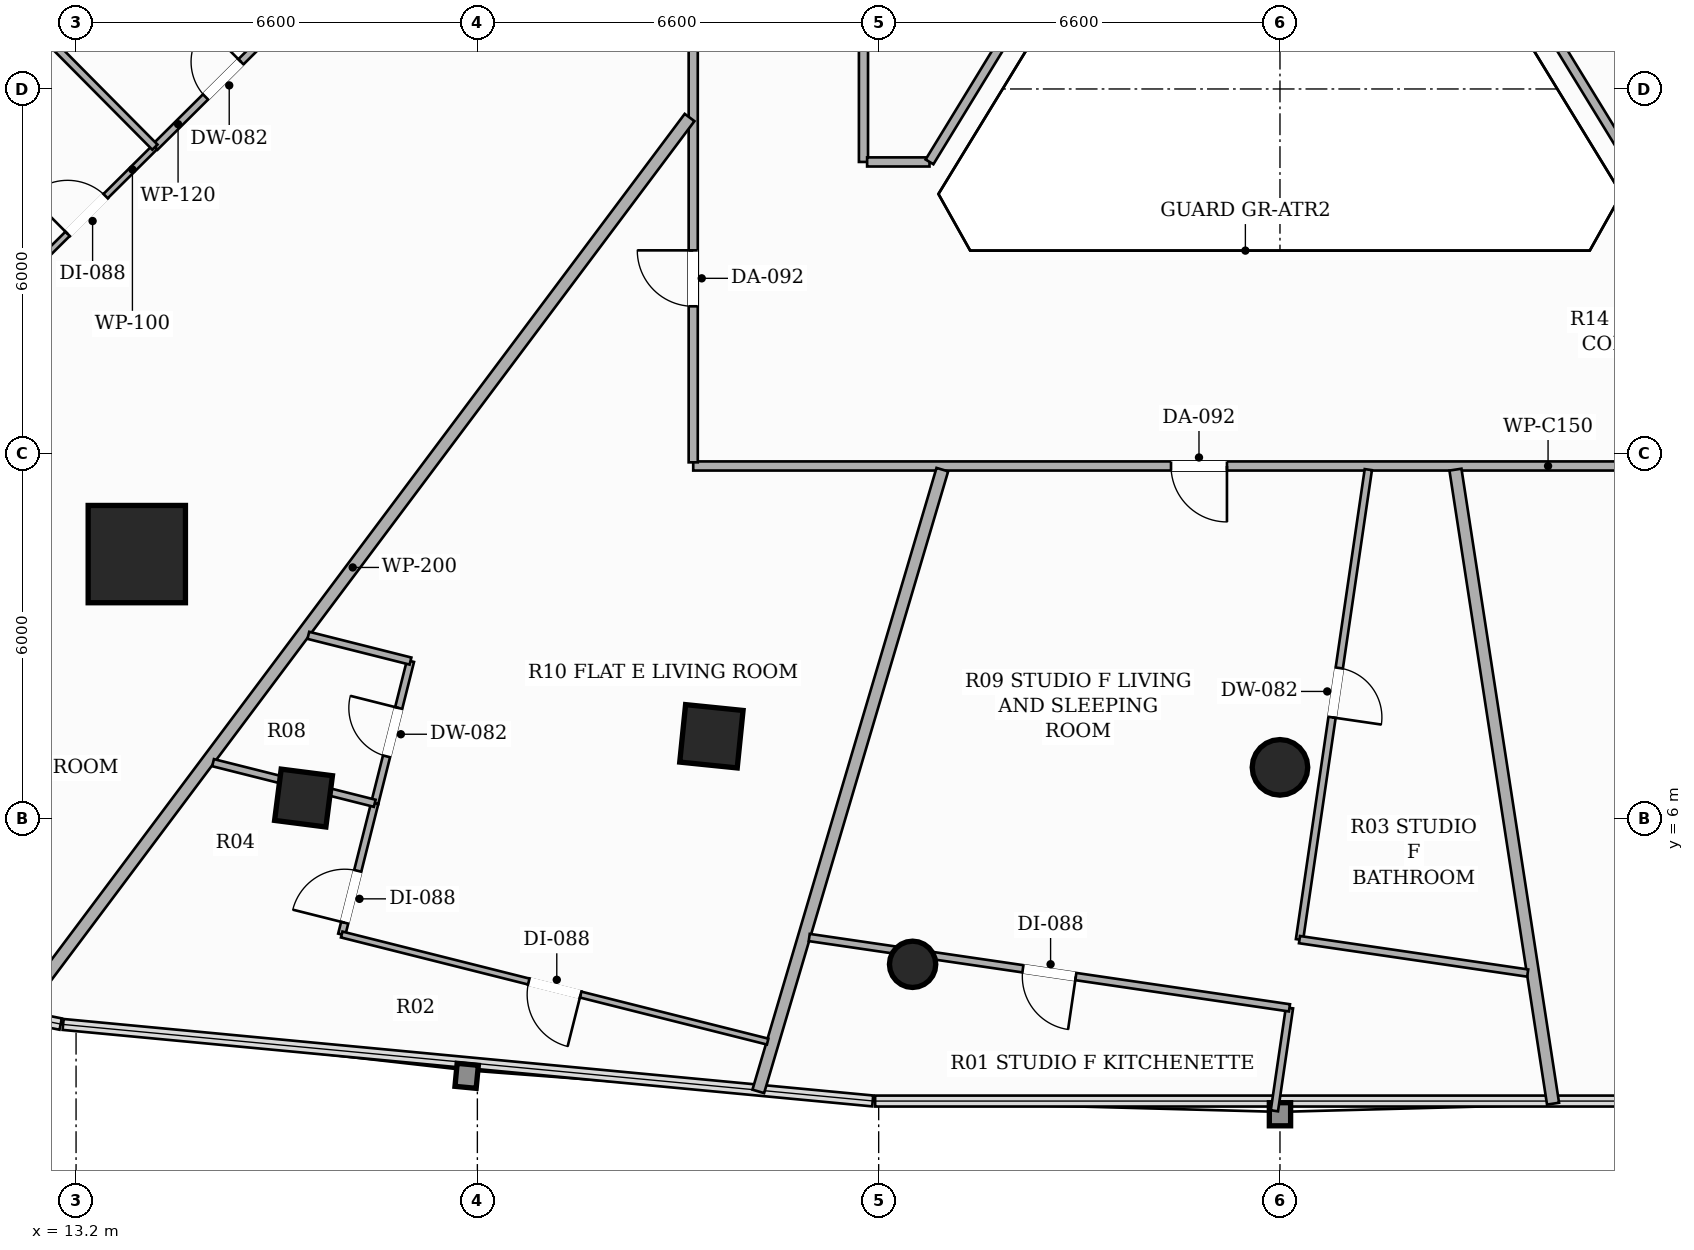
"""IFC4 building model, lengths in metres.
Left out: names, types, materials, properties, quantities, classifications, styles, units other than length and angle.
Written with IfcOpenShell. Run it as: python <this file> out.ifc"""

import sys

from ifc_helpers import new_model, si_unit, direction, frame, frame_2d, origin, origin_2d, place, context, subcontext, project, spatial, rectangle, hollow_rectangle, hollow_circle, extrude, element, fill, save


model = new_model("IFC4")
c1 = context("Model", 3, precision=1e-05, world=origin(), true_north=direction((0.0, 1.0)))
c2 = subcontext(c1, "Body", "Model", "MODEL_VIEW")
j1 = project(units=[si_unit("LENGTHUNIT", "METRE"), si_unit("PLANEANGLEUNIT", "RADIAN")], contexts=[c1])
p1 = place(None, origin())
s1 = spatial("IfcSite", under=j1, at=p1, CompositionType="ELEMENT")
p2 = place(p1, origin())
s2 = spatial("IfcBuilding", under=s1, at=p2, CompositionType="ELEMENT")
p3 = place(p2, frame((0.0, 0.0, 40.1)))
s3 = spatial("IfcBuildingStorey", under=s2, at=p3, CompositionType="ELEMENT", Elevation=40.1)
p4 = place(p3, frame((14.199, 10.351, 0.0), z_axis=(0.0, 0.0, 1.0), x_axis=(1.0, 0.0, 0.0)))
e1 = element("IfcColumn", 1, at=p4, inside=s3, PredefinedType="COLUMN", context=c2, shape_type="SweptSolid", body=[
    extrude(hollow_rectangle(XDim=1.6, YDim=1.6, WallThickness=0.05, at=origin_2d()), origin(), (0.0, 0.0, 1.0), 3.3),
])
p5 = place(p3, frame((23.649, 7.355, 0.0), z_axis=(0.0, 0.0, 1.0), x_axis=(-0.994880708829, 0.101056297183, 0.0)))
e2 = element("IfcColumn", 2, at=p5, inside=s3, PredefinedType="COLUMN", context=c2, shape_type="SweptSolid", body=[
    extrude(hollow_rectangle(XDim=0.95, YDim=0.95, WallThickness=0.032, at=origin_2d()), origin(), (0.0, 0.0, 1.0), 3.3),
])
p6 = place(p3, frame((33.0, 6.844, 0.0), z_axis=(0.0, 0.0, 1.0), x_axis=(1.0, 0.0, 0.0)))
e3 = element("IfcColumn", 3, at=p6, inside=s3, PredefinedType="COLUMN", context=c2, shape_type="SweptSolid", body=[
    extrude(hollow_circle(Radius=0.457, WallThickness=0.025, at=origin_2d()), origin(), (0.0, 0.0, 1.0), 3.3),
])
p7 = place(p3, frame((16.941, 6.339, 0.0), z_axis=(0.0, 0.0, 1.0), x_axis=(-0.99189444259, 0.127064608601, 0.0)))
e4 = element("IfcColumn", 4, at=p7, inside=s3, PredefinedType="COLUMN", context=c2, shape_type="SweptSolid", body=[
    extrude(hollow_rectangle(XDim=0.85, YDim=0.85, WallThickness=0.028, at=origin_2d()), origin(), (0.0, 0.0, 1.0), 3.3),
])
p8 = place(p3, frame((26.958, 3.605, 0.0), z_axis=(0.0, 0.0, 1.0), x_axis=(1.0, 0.0, 0.0)))
e5 = element("IfcColumn", 5, at=p8, inside=s3, PredefinedType="COLUMN", context=c2, shape_type="SweptSolid", body=[
    extrude(hollow_circle(Radius=0.381, WallThickness=0.022, at=origin_2d()), origin(), (0.0, 0.0, 1.0), 3.3),
])
p9 = place(p3, frame((42.59, 11.8, 0.0), z_axis=(0.0, 0.0, 1.0), x_axis=(-1.0, 0.0, 0.0)))
e6 = element("IfcWall", 6, at=p9, inside=s3, PredefinedType="PARTITIONING", context=c2, shape_type="SweptSolid", body=[
    extrude(rectangle(XDim=19.24, YDim=0.15, at=frame_2d((9.62, 0.0))), origin(), (0.0, 0.0, 1.0), 2.669),
])
p10 = place(p9, frame((10.462, 0.0, 0.0)))
e7 = element("IfcOpeningElement", 7, at=p10, cuts=e6, PredefinedType="OPENING", context=c2, shape_type="SweptSolid", body=[
    extrude(rectangle(XDim=0.92, YDim=2.15, at=frame_2d((0.46, 1.075))), frame((0.0, 0.085, 0.0), z_axis=(0.0, -1.0, 0.0), x_axis=(1.0, 0.0, 0.0)), (0.0, 0.0, 1.0), 0.17),
])
p11 = place(p3, frame((23.35, 11.86, 0.0), z_axis=(0.0, 0.0, 1.0), x_axis=(0.0, 1.0, 0.0)))
e8 = element("IfcWall", 8, at=p11, inside=s3, PredefinedType="PARTITIONING", context=c2, shape_type="SweptSolid", body=[
    extrude(rectangle(XDim=25.04, YDim=0.15, at=frame_2d((12.52, 0.0))), origin(), (0.0, 0.0, 1.0), 2.413),
])
p12 = place(p11, frame((9.29, 0.0, 0.0)))
e9 = element("IfcOpeningElement", 9, at=p12, cuts=e8, PredefinedType="OPENING", context=c2, shape_type="SweptSolid", body=[
    extrude(rectangle(XDim=0.92, YDim=2.15, at=frame_2d((0.46, 1.075))), frame((0.0, 0.085, 0.0), z_axis=(0.0, -1.0, 0.0), x_axis=(1.0, 0.0, 0.0)), (0.0, 0.0, 1.0), 0.17),
])
p13 = place(p11, frame((18.865, 0.0, 0.0)))
e10 = element("IfcOpeningElement", 10, at=p13, cuts=e8, PredefinedType="OPENING", context=c2, shape_type="SweptSolid", body=[
    extrude(rectangle(XDim=0.88, YDim=2.1, at=frame_2d((0.44, 1.05))), frame((0.0, 0.085, 0.0), z_axis=(0.0, -1.0, 0.0), x_axis=(1.0, 0.0, 0.0)), (0.0, 0.0, 1.0), 0.17),
])
p14 = place(p11, frame((2.566, 0.0, 0.0)))
e11 = element("IfcOpeningElement", 11, at=p14, cuts=e8, PredefinedType="OPENING", context=c2, shape_type="SweptSolid", body=[
    extrude(rectangle(XDim=0.92, YDim=2.15, at=frame_2d((0.46, 1.075))), frame((0.0, 0.085, 0.0), z_axis=(0.0, -1.0, 0.0), x_axis=(1.0, 0.0, 0.0)), (0.0, 0.0, 1.0), 0.17),
])
p15 = place(p3, frame((26.15, 23.79, 0.0), z_axis=(0.0, 0.0, 1.0), x_axis=(0.0, -1.0, 0.0)))
e12 = element("IfcWall", 12, at=p15, inside=s3, PredefinedType="PARTITIONING", context=c2, shape_type="SweptSolid", body=[
    extrude(rectangle(XDim=6.99, YDim=0.15, at=frame_2d((3.495, 0.0))), origin(), (0.0, 0.0, 1.0), 2.669),
])
p16 = place(p15, frame((3.055, 0.0, 0.0)))
e13 = element("IfcOpeningElement", 13, at=p16, cuts=e12, PredefinedType="OPENING", context=c2, shape_type="SweptSolid", body=[
    extrude(rectangle(XDim=0.88, YDim=2.1, at=frame_2d((0.44, 1.05))), frame((0.0, 0.085, 0.0), z_axis=(0.0, -1.0, 0.0), x_axis=(1.0, 0.0, 0.0)), (0.0, 0.0, 1.0), 0.17),
])
p17 = place(p3, frame((26.21, 16.8, 0.0), z_axis=(0.0, 0.0, 1.0), x_axis=(1.0, 0.0, 0.0)))
e14 = element("IfcWall", 14, at=p17, inside=s3, PredefinedType="PARTITIONING", context=c2, shape_type="SweptSolid", body=[
    extrude(rectangle(XDim=1.026, YDim=0.15, at=frame_2d((0.513, 0.0))), origin(), (0.0, 0.0, 1.0), 3.06),
])
p18 = place(p3, frame((27.236, 16.801, 0.0), z_axis=(0.0, 0.0, 1.0), x_axis=(0.521617567684, 0.853179414358, 0.0)))
e15 = element("IfcWall", 15, at=p18, inside=s3, PredefinedType="PARTITIONING", context=c2, shape_type="SweptSolid", body=[
    extrude(rectangle(XDim=8.192, YDim=0.15, at=frame_2d((4.096, 0.0))), origin(), (0.0, 0.0, 1.0), 2.669),
])
p19 = place(p3, frame((34.486, 23.79, 0.0), z_axis=(0.0, 0.0, 1.0), x_axis=(0.521998190399, -0.852946592244, 0.0)))
e16 = element("IfcWall", 16, at=p19, inside=s3, PredefinedType="PARTITIONING", context=c2, shape_type="SweptSolid", body=[
    extrude(rectangle(XDim=8.195, YDim=0.15, at=frame_2d((4.098, 0.0))), origin(), (0.0, 0.0, 1.0), 2.669),
])
p20 = place(p3, frame((23.29, 17.531, 0.0), z_axis=(0.0, 0.0, 1.0), x_axis=(-0.599334217596, -0.800498904196, 0.0)))
e17 = element("IfcWall", 17, at=p20, inside=s3, PredefinedType="PARTITIONING", context=c2, shape_type="SweptSolid", body=[
    extrude(rectangle(XDim=18.487, YDim=0.2, at=frame_2d((9.244, 0.0))), origin(), (0.0, 0.0, 1.0), 2.413),
])
p21 = place(p3, frame((37.491, 1.313, 0.0), z_axis=(0.0, 0.0, 1.0), x_axis=(-0.152133698634, 0.988359923176, 0.0)))
e18 = element("IfcWall", 18, at=p21, inside=s3, PredefinedType="PARTITIONING", context=c2, shape_type="SweptSolid", body=[
    extrude(rectangle(XDim=10.55, YDim=0.2, at=frame_2d((5.275, 0.0))), origin(), (0.0, 0.0, 1.0), 2.413),
])
p22 = place(p3, frame((27.447, 11.74, 0.0), z_axis=(0.0, 0.0, 1.0), x_axis=(-0.283867721737, -0.958863450422, 0.0)))
e19 = element("IfcWall", 19, at=p22, inside=s3, PredefinedType="PARTITIONING", context=c2, shape_type="SweptSolid", body=[
    extrude(rectangle(XDim=10.664, YDim=0.2, at=frame_2d((5.332, 0.0))), origin(), (0.0, 0.0, 1.0), 2.413),
])
p23 = place(p3, frame((14.497, 17.043, 0.0), z_axis=(0.0, 0.0, 1.0), x_axis=(0.709608291954, 0.704596389425, 0.0)))
e20 = element("IfcWall", 20, at=p23, inside=s3, PredefinedType="PARTITIONING", context=c2, shape_type="SweptSolid", body=[
    extrude(rectangle(XDim=3.166, YDim=0.12, at=frame_2d((1.583, 0.0))), origin(), (0.0, 0.0, 1.0), 2.413),
])
p24 = place(p23, frame((1.173, 0.0, 0.0)))
e21 = element("IfcOpeningElement", 21, at=p24, cuts=e20, PredefinedType="OPENING", context=c2, shape_type="SweptSolid", body=[
    extrude(rectangle(XDim=0.82, YDim=2.1, at=frame_2d((0.41, 1.05))), frame((0.0, 0.07, 0.0), z_axis=(0.0, -1.0, 0.0), x_axis=(1.0, 0.0, 0.0)), (0.0, 0.0, 1.0), 0.14),
])
p25 = place(p3, frame((12.249, 14.812, 0.0), z_axis=(0.0, 0.0, 1.0), x_axis=(0.70979961262, 0.70440365553, 0.0)))
e22 = element("IfcWall", 22, at=p25, inside=s3, PredefinedType="PARTITIONING", context=c2, shape_type="SweptSolid", body=[
    extrude(rectangle(XDim=3.167, YDim=0.1, at=frame_2d((1.583, 0.0))), origin(), (0.0, 0.0, 1.0), 2.413),
])
p26 = place(p25, frame((1.144, 0.0, 0.0)))
e23 = element("IfcOpeningElement", 23, at=p26, cuts=e22, PredefinedType="OPENING", context=c2, shape_type="SweptSolid", body=[
    extrude(rectangle(XDim=0.88, YDim=2.1, at=frame_2d((0.44, 1.05))), frame((0.0, 0.06, 0.0), z_axis=(0.0, -1.0, 0.0), x_axis=(1.0, 0.0, 0.0)), (0.0, 0.0, 1.0), 0.12),
])
p27 = place(p3, frame((14.497, 17.043, 0.0), z_axis=(0.0, 0.0, 1.0), x_axis=(-0.704380529073, 0.70982256252, 0.0)))
e24 = element("IfcWall", 24, at=p27, inside=s3, PredefinedType="PARTITIONING", context=c2, shape_type="SweptSolid", body=[
    extrude(rectangle(XDim=4.038, YDim=0.12, at=frame_2d((2.019, 0.0))), origin(), (0.0, 0.0, 1.0), 2.413),
])
p28 = place(p3, frame((18.112, 6.253, 0.0), z_axis=(0.0, 0.0, 1.0), x_axis=(0.2437501366, 0.96983806427, 0.0)))
e25 = element("IfcWall", 25, at=p28, inside=s3, PredefinedType="PARTITIONING", context=c2, shape_type="SweptSolid", body=[
    extrude(rectangle(XDim=2.412, YDim=0.12, at=frame_2d((1.206, 0.0))), origin(), (0.0, 0.0, 1.0), 2.413),
])
p29 = place(p28, frame((0.796, 0.0, 0.0)))
e26 = element("IfcOpeningElement", 26, at=p29, cuts=e25, PredefinedType="OPENING", context=c2, shape_type="SweptSolid", body=[
    extrude(rectangle(XDim=0.82, YDim=2.1, at=frame_2d((0.41, 1.05))), frame((0.0, 0.07, 0.0), z_axis=(0.0, -1.0, 0.0), x_axis=(1.0, 0.0, 0.0)), (0.0, 0.0, 1.0), 0.14),
])
p30 = place(p3, frame((18.7, 8.592, 0.0), z_axis=(0.0, 0.0, 1.0), x_axis=(-0.969751613308, 0.244093851802, 0.0)))
e27 = element("IfcWall", 27, at=p30, inside=s3, PredefinedType="PARTITIONING", context=c2, shape_type="SweptSolid", body=[
    extrude(rectangle(XDim=1.732, YDim=0.12, at=frame_2d((0.866, 0.0))), origin(), (0.0, 0.0, 1.0), 2.669),
])
p31 = place(p3, frame((17.569, 4.095, 0.0), z_axis=(0.0, 0.0, 1.0), x_axis=(0.244006821807, 0.969773515266, 0.0)))
e28 = element("IfcWall", 28, at=p31, inside=s3, PredefinedType="PARTITIONING", context=c2, shape_type="SweptSolid", body=[
    extrude(rectangle(XDim=2.225, YDim=0.12, at=frame_2d((1.113, 0.0))), origin(), (0.0, 0.0, 1.0), 2.413),
])
p32 = place(p31, frame((0.2, 0.0, 0.0)))
e29 = element("IfcOpeningElement", 29, at=p32, cuts=e28, PredefinedType="OPENING", context=c2, shape_type="SweptSolid", body=[
    extrude(rectangle(XDim=0.88, YDim=2.1, at=frame_2d((0.44, 1.05))), frame((0.0, 0.07, 0.0), z_axis=(0.0, -1.0, 0.0), x_axis=(1.0, 0.0, 0.0)), (0.0, 0.0, 1.0), 0.14),
])
p33 = place(p3, frame((24.574, 2.334, 0.0), z_axis=(0.0, 0.0, 1.0), x_axis=(-0.9698235368, 0.243807931512, 0.0)))
e30 = element("IfcWall", 30, at=p33, inside=s3, PredefinedType="PARTITIONING", context=c2, shape_type="SweptSolid", body=[
    extrude(rectangle(XDim=7.223, YDim=0.1, at=frame_2d((3.611, 0.0))), origin(), (0.0, 0.0, 1.0), 3.06),
])
p34 = place(p33, frame((3.171, 0.0, 0.0)))
e31 = element("IfcOpeningElement", 31, at=p34, cuts=e30, PredefinedType="OPENING", context=c2, shape_type="SweptSolid", body=[
    extrude(rectangle(XDim=0.88, YDim=2.1, at=frame_2d((0.44, 1.05))), frame((0.0, 0.06, 0.0), z_axis=(0.0, -1.0, 0.0), x_axis=(1.0, 0.0, 0.0)), (0.0, 0.0, 1.0), 0.12),
])
p35 = place(p3, frame((18.112, 6.253, 0.0), z_axis=(0.0, 0.0, 1.0), x_axis=(-0.969869517874, 0.243624954178, 0.0)))
e32 = element("IfcWall", 32, at=p35, inside=s3, PredefinedType="PARTITIONING", context=c2, shape_type="SweptSolid", body=[
    extrude(rectangle(XDim=2.742, YDim=0.12, at=frame_2d((1.371, 0.0))), origin(), (0.0, 0.0, 1.0), 2.413),
])
p36 = place(p3, frame((34.453, 11.74, 0.0), z_axis=(0.0, 0.0, 1.0), x_axis=(-0.14489470787, -0.989447079753, 0.0)))
e33 = element("IfcWall", 33, at=p36, inside=s3, PredefinedType="PARTITIONING", context=c2, shape_type="SweptSolid", body=[
    extrude(rectangle(XDim=7.812, YDim=0.12, at=frame_2d((3.906, 0.0))), origin(), (0.0, 0.0, 1.0), 2.413),
])
p37 = place(p36, frame((3.297, 0.0, 0.0)))
e34 = element("IfcOpeningElement", 34, at=p37, cuts=e33, PredefinedType="OPENING", context=c2, shape_type="SweptSolid", body=[
    extrude(rectangle(XDim=0.82, YDim=2.1, at=frame_2d((0.41, 1.05))), frame((0.0, 0.07, 0.0), z_axis=(0.0, -1.0, 0.0), x_axis=(1.0, 0.0, 0.0)), (0.0, 0.0, 1.0), 0.14),
])
p38 = place(p3, frame((33.321, 4.011, 0.0), z_axis=(0.0, 0.0, 1.0), x_axis=(0.98942932615, -0.145015890698, 0.0)))
e35 = element("IfcWall", 35, at=p38, inside=s3, PredefinedType="PARTITIONING", context=c2, shape_type="SweptSolid", body=[
    extrude(rectangle(XDim=3.793, YDim=0.12, at=frame_2d((1.896, 0.0))), origin(), (0.0, 0.0, 1.0), 3.06),
])
p39 = place(p3, frame((32.908, 1.196, 0.0), z_axis=(0.0, 0.0, 1.0), x_axis=(0.144976360118, 0.98943511915, 0.0)))
e36 = element("IfcWall", 36, at=p39, inside=s3, PredefinedType="PARTITIONING", context=c2, shape_type="SweptSolid", body=[
    extrude(rectangle(XDim=1.711, YDim=0.12, at=frame_2d((0.855, 0.0))), origin(), (0.0, 0.0, 1.0), 3.06),
])
p40 = place(p3, frame((33.156, 2.889, 0.0), z_axis=(0.0, 0.0, 1.0), x_axis=(-0.98943978436, 0.144944517406, 0.0)))
e37 = element("IfcWall", 37, at=p40, inside=s3, PredefinedType="PARTITIONING", context=c2, shape_type="SweptSolid", body=[
    extrude(rectangle(XDim=7.982, YDim=0.12, at=frame_2d((3.991, 0.0))), origin(), (0.0, 0.0, 1.0), 2.413),
])
p41 = place(p40, frame((3.551, 0.0, 0.0)))
e38 = element("IfcOpeningElement", 38, at=p41, cuts=e37, PredefinedType="OPENING", context=c2, shape_type="SweptSolid", body=[
    extrude(rectangle(XDim=0.88, YDim=2.1, at=frame_2d((0.44, 1.05))), frame((0.0, 0.07, 0.0), z_axis=(0.0, -1.0, 0.0), x_axis=(1.0, 0.0, 0.0)), (0.0, 0.0, 1.0), 0.14),
])
p42 = place(p24, origin())
e39 = element("IfcDoor", 39, at=p42, inside=s3, OperationType="SINGLE_SWING_RIGHT", PredefinedType="DOOR", context=c2, shape_type="SweptSolid", body=[
    extrude(rectangle(XDim=0.82, YDim=2.1, at=frame_2d((0.41, 1.05))), frame((0.0, 0.025, 0.0), z_axis=(0.0, -1.0, 0.0), x_axis=(1.0, 0.0, 0.0)), (0.0, 0.0, 1.0), 0.05),
])
fill(e21, e39)
p43 = place(p26, origin())
e40 = element("IfcDoor", 40, at=p43, inside=s3, OperationType="SINGLE_SWING_LEFT", PredefinedType="DOOR", context=c2, shape_type="SweptSolid", body=[
    extrude(rectangle(XDim=0.88, YDim=2.1, at=frame_2d((0.44, 1.05))), frame((0.0, 0.025, 0.0), z_axis=(0.0, -1.0, 0.0), x_axis=(1.0, 0.0, 0.0)), (0.0, 0.0, 1.0), 0.05),
])
fill(e23, e40)
p44 = place(p14, origin())
e41 = element("IfcDoor", 41, at=p44, inside=s3, OperationType="SINGLE_SWING_RIGHT", PredefinedType="DOOR", context=c2, shape_type="SweptSolid", body=[
    extrude(rectangle(XDim=0.92, YDim=2.15, at=frame_2d((0.46, 1.075))), frame((0.0, 0.025, 0.0), z_axis=(0.0, -1.0, 0.0), x_axis=(1.0, 0.0, 0.0)), (0.0, 0.0, 1.0), 0.05),
])
fill(e11, e41)
p45 = place(p29, origin())
e42 = element("IfcDoor", 42, at=p45, inside=s3, OperationType="SINGLE_SWING_RIGHT", PredefinedType="DOOR", context=c2, shape_type="SweptSolid", body=[
    extrude(rectangle(XDim=0.82, YDim=2.1, at=frame_2d((0.41, 1.05))), frame((0.0, 0.025, 0.0), z_axis=(0.0, -1.0, 0.0), x_axis=(1.0, 0.0, 0.0)), (0.0, 0.0, 1.0), 0.05),
])
fill(e26, e42)
p46 = place(p32, origin())
e43 = element("IfcDoor", 43, at=p46, inside=s3, OperationType="SINGLE_SWING_LEFT", PredefinedType="DOOR", context=c2, shape_type="SweptSolid", body=[
    extrude(rectangle(XDim=0.88, YDim=2.1, at=frame_2d((0.44, 1.05))), frame((0.0, 0.025, 0.0), z_axis=(0.0, -1.0, 0.0), x_axis=(1.0, 0.0, 0.0)), (0.0, 0.0, 1.0), 0.05),
])
fill(e29, e43)
p47 = place(p34, origin())
e44 = element("IfcDoor", 44, at=p47, inside=s3, OperationType="SINGLE_SWING_LEFT", PredefinedType="DOOR", context=c2, shape_type="SweptSolid", body=[
    extrude(rectangle(XDim=0.88, YDim=2.1, at=frame_2d((0.44, 1.05))), frame((0.0, 0.025, 0.0), z_axis=(0.0, -1.0, 0.0), x_axis=(1.0, 0.0, 0.0)), (0.0, 0.0, 1.0), 0.05),
])
fill(e31, e44)
p48 = place(p10, origin())
e45 = element("IfcDoor", 45, at=p48, inside=s3, OperationType="SINGLE_SWING_LEFT", PredefinedType="DOOR", context=c2, shape_type="SweptSolid", body=[
    extrude(rectangle(XDim=0.92, YDim=2.15, at=frame_2d((0.46, 1.075))), frame((0.0, 0.025, 0.0), z_axis=(0.0, -1.0, 0.0), x_axis=(1.0, 0.0, 0.0)), (0.0, 0.0, 1.0), 0.05),
])
fill(e7, e45)
p49 = place(p37, origin())
e46 = element("IfcDoor", 46, at=p49, inside=s3, OperationType="SINGLE_SWING_RIGHT", PredefinedType="DOOR", context=c2, shape_type="SweptSolid", body=[
    extrude(rectangle(XDim=0.82, YDim=2.1, at=frame_2d((0.41, 1.05))), frame((0.0, 0.025, 0.0), z_axis=(0.0, -1.0, 0.0), x_axis=(1.0, 0.0, 0.0)), (0.0, 0.0, 1.0), 0.05),
])
fill(e34, e46)
p50 = place(p41, origin())
e47 = element("IfcDoor", 47, at=p50, inside=s3, OperationType="SINGLE_SWING_LEFT", PredefinedType="DOOR", context=c2, shape_type="SweptSolid", body=[
    extrude(rectangle(XDim=0.88, YDim=2.1, at=frame_2d((0.44, 1.05))), frame((0.0, 0.025, 0.0), z_axis=(0.0, -1.0, 0.0), x_axis=(1.0, 0.0, 0.0)), (0.0, 0.0, 1.0), 0.05),
])
fill(e38, e47)
save(model, sys.argv[1])
